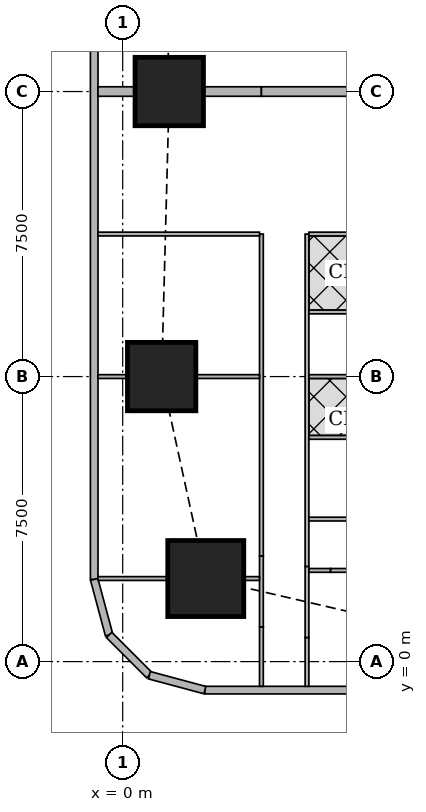
"""IFC4 building model, lengths in metres.
Left out: names, types, materials, properties, quantities, classifications, styles, units other than length and angle.
Written with IfcOpenShell. Run it as: python <this file> out.ifc"""

import sys

from ifc_helpers import new_model, si_unit, direction, frame, frame_2d, origin, origin_2d, place, context, subcontext, project, spatial, rectangle, extrude, element, fill, save


model = new_model("IFC4")
c1 = context("Model", 3, precision=1e-05, world=origin(), true_north=direction((0.0, 1.0)))
c2 = subcontext(c1, "Body", "Model", "MODEL_VIEW")
j1 = project(units=[si_unit("LENGTHUNIT", "METRE"), si_unit("PLANEANGLEUNIT", "RADIAN")], contexts=[c1])
p1 = place(None, origin())
s1 = spatial("IfcSite", under=j1, at=p1, CompositionType="ELEMENT")
p2 = place(p1, origin())
s2 = spatial("IfcBuilding", under=s1, at=p2, CompositionType="ELEMENT")
p3 = place(p2, frame((0.0, 0.0, 180.8)))
s3 = spatial("IfcBuildingStorey", under=s2, at=p3, CompositionType="ELEMENT", Elevation=180.8)
p4 = place(p3, frame((2.186, 2.186, 0.0), z_axis=(0.0, 0.0, 1.0), x_axis=(1.0, 0.0, 0.0)))
e1 = element("IfcColumn", 1, at=p4, inside=s3, PredefinedType="COLUMN", context=c2, shape_type="SweptSolid", body=[
    extrude(rectangle(XDim=2.0, YDim=2.0, at=origin_2d()), origin(), (0.0, 0.0, 1.0), 3.75),
])
for number, where, z_axis, x_axis in (
    (2, (1.025, 7.5, 0.0), (0.0, 0.0, 1.0), (1.0, 0.0, 0.0)),
    (3, (1.225, 15.0, 0.0), (0.0, 0.0, 1.0), (1.0, 0.0, 0.0)),
):
    element("IfcColumn", number, at=place(p3, frame(where, z_axis=z_axis, x_axis=x_axis)), inside=s3, PredefinedType="COLUMN", context=c2, shape_type="SweptSolid", body=[
        extrude(rectangle(XDim=1.8, YDim=1.8, at=origin_2d()), origin(), (0.0, 0.0, 1.0), 3.75),
    ])
p5 = place(p3, frame((2.163, -0.75, 0.0), z_axis=(0.0, 0.0, 1.0), x_axis=(1.0, 0.0, 0.0)))
e4 = element("IfcWall", 4, at=p5, inside=s3, PredefinedType="SOLIDWALL", context=c2, shape_type="SweptSolid", body=[
    extrude(rectangle(XDim=45.628, YDim=0.2, at=frame_2d((22.814, 0.0))), origin(), (0.0, 0.0, 1.0), 3.5),
])
p6 = place(p5, frame((9.537, 0.0, 0.9)))
e5 = element("IfcOpeningElement", 5, at=p6, cuts=e4, PredefinedType="OPENING", context=c2, shape_type="SweptSolid", body=[
    extrude(rectangle(XDim=1.8, YDim=1.5, at=frame_2d((0.9, 0.75))), frame((0.0, 0.11, 0.0), z_axis=(0.0, -1.0, 0.0), x_axis=(1.0, 0.0, 0.0)), (0.0, 0.0, 1.0), 0.22),
])
p7 = place(p5, frame((13.137, 0.0, 0.9)))
e6 = element("IfcOpeningElement", 6, at=p7, cuts=e4, PredefinedType="OPENING", context=c2, shape_type="SweptSolid", body=[
    extrude(rectangle(XDim=1.8, YDim=1.5, at=frame_2d((0.9, 0.75))), frame((0.0, 0.11, 0.0), z_axis=(0.0, -1.0, 0.0), x_axis=(1.0, 0.0, 0.0)), (0.0, 0.0, 1.0), 0.22),
])
p8 = place(p5, frame((16.737, 0.0, 0.9)))
e7 = element("IfcOpeningElement", 7, at=p8, cuts=e4, PredefinedType="OPENING", context=c2, shape_type="SweptSolid", body=[
    extrude(rectangle(XDim=1.8, YDim=1.5, at=frame_2d((0.9, 0.75))), frame((0.0, 0.11, 0.0), z_axis=(0.0, -1.0, 0.0), x_axis=(1.0, 0.0, 0.0)), (0.0, 0.0, 1.0), 0.22),
])
p9 = place(p5, frame((20.337, 0.0, 0.9)))
e8 = element("IfcOpeningElement", 8, at=p9, cuts=e4, PredefinedType="OPENING", context=c2, shape_type="SweptSolid", body=[
    extrude(rectangle(XDim=1.8, YDim=1.5, at=frame_2d((0.9, 0.75))), frame((0.0, 0.11, 0.0), z_axis=(0.0, -1.0, 0.0), x_axis=(1.0, 0.0, 0.0)), (0.0, 0.0, 1.0), 0.22),
])
p10 = place(p5, frame((23.937, 0.0, 0.9)))
e9 = element("IfcOpeningElement", 9, at=p10, cuts=e4, PredefinedType="OPENING", context=c2, shape_type="SweptSolid", body=[
    extrude(rectangle(XDim=1.8, YDim=1.5, at=frame_2d((0.9, 0.75))), frame((0.0, 0.11, 0.0), z_axis=(0.0, -1.0, 0.0), x_axis=(1.0, 0.0, 0.0)), (0.0, 0.0, 1.0), 0.22),
])
p11 = place(p5, frame((27.537, 0.0, 0.9)))
e10 = element("IfcOpeningElement", 10, at=p11, cuts=e4, PredefinedType="OPENING", context=c2, shape_type="SweptSolid", body=[
    extrude(rectangle(XDim=1.8, YDim=1.5, at=frame_2d((0.9, 0.75))), frame((0.0, 0.11, 0.0), z_axis=(0.0, -1.0, 0.0), x_axis=(1.0, 0.0, 0.0)), (0.0, 0.0, 1.0), 0.22),
])
p12 = place(p5, frame((31.137, 0.0, 0.9)))
e11 = element("IfcOpeningElement", 11, at=p12, cuts=e4, PredefinedType="OPENING", context=c2, shape_type="SweptSolid", body=[
    extrude(rectangle(XDim=1.8, YDim=1.5, at=frame_2d((0.9, 0.75))), frame((0.0, 0.11, 0.0), z_axis=(0.0, -1.0, 0.0), x_axis=(1.0, 0.0, 0.0)), (0.0, 0.0, 1.0), 0.22),
])
p13 = place(p5, frame((34.737, 0.0, 0.9)))
e12 = element("IfcOpeningElement", 12, at=p13, cuts=e4, PredefinedType="OPENING", context=c2, shape_type="SweptSolid", body=[
    extrude(rectangle(XDim=1.8, YDim=1.5, at=frame_2d((0.9, 0.75))), frame((0.0, 0.11, 0.0), z_axis=(0.0, -1.0, 0.0), x_axis=(1.0, 0.0, 0.0)), (0.0, 0.0, 1.0), 0.22),
])
p14 = place(p3, frame((-0.75, 42.837, 0.0), z_axis=(0.0, 0.0, 1.0), x_axis=(0.0, -1.0, 0.0)))
e13 = element("IfcWall", 13, at=p14, inside=s3, PredefinedType="SOLIDWALL", context=c2, shape_type="SweptSolid", body=[
    extrude(rectangle(XDim=40.674, YDim=0.2, at=frame_2d((20.337, 0.0))), origin(), (0.0, 0.0, 1.0), 3.5),
])
p15 = place(p14, frame((1.78, 0.0, 0.9)))
e14 = element("IfcOpeningElement", 14, at=p15, cuts=e13, PredefinedType="OPENING", context=c2, shape_type="SweptSolid", body=[
    extrude(rectangle(XDim=1.8, YDim=1.5, at=frame_2d((0.9, 0.75))), frame((0.0, 0.11, 0.0), z_axis=(0.0, -1.0, 0.0), x_axis=(1.0, 0.0, 0.0)), (0.0, 0.0, 1.0), 0.22),
])
p16 = place(p14, frame((6.312, 0.0, 0.9)))
e15 = element("IfcOpeningElement", 15, at=p16, cuts=e13, PredefinedType="OPENING", context=c2, shape_type="SweptSolid", body=[
    extrude(rectangle(XDim=1.8, YDim=1.5, at=frame_2d((0.9, 0.75))), frame((0.0, 0.11, 0.0), z_axis=(0.0, -1.0, 0.0), x_axis=(1.0, 0.0, 0.0)), (0.0, 0.0, 1.0), 0.22),
])
p17 = place(p14, frame((10.062, 0.0, 0.9)))
e16 = element("IfcOpeningElement", 16, at=p17, cuts=e13, PredefinedType="OPENING", context=c2, shape_type="SweptSolid", body=[
    extrude(rectangle(XDim=1.8, YDim=1.5, at=frame_2d((0.9, 0.75))), frame((0.0, 0.11, 0.0), z_axis=(0.0, -1.0, 0.0), x_axis=(1.0, 0.0, 0.0)), (0.0, 0.0, 1.0), 0.22),
])
p18 = place(p14, frame((13.812, 0.0, 0.9)))
e17 = element("IfcOpeningElement", 17, at=p18, cuts=e13, PredefinedType="OPENING", context=c2, shape_type="SweptSolid", body=[
    extrude(rectangle(XDim=1.8, YDim=1.5, at=frame_2d((0.9, 0.75))), frame((0.0, 0.11, 0.0), z_axis=(0.0, -1.0, 0.0), x_axis=(1.0, 0.0, 0.0)), (0.0, 0.0, 1.0), 0.22),
])
p19 = place(p14, frame((17.562, 0.0, 0.9)))
e18 = element("IfcOpeningElement", 18, at=p19, cuts=e13, PredefinedType="OPENING", context=c2, shape_type="SweptSolid", body=[
    extrude(rectangle(XDim=1.8, YDim=1.5, at=frame_2d((0.9, 0.75))), frame((0.0, 0.11, 0.0), z_axis=(0.0, -1.0, 0.0), x_axis=(1.0, 0.0, 0.0)), (0.0, 0.0, 1.0), 0.22),
])
p20 = place(p14, frame((21.312, 0.0, 0.9)))
e19 = element("IfcOpeningElement", 19, at=p20, cuts=e13, PredefinedType="OPENING", context=c2, shape_type="SweptSolid", body=[
    extrude(rectangle(XDim=1.8, YDim=1.5, at=frame_2d((0.9, 0.75))), frame((0.0, 0.11, 0.0), z_axis=(0.0, -1.0, 0.0), x_axis=(1.0, 0.0, 0.0)), (0.0, 0.0, 1.0), 0.22),
])
p21 = place(p14, frame((25.062, 0.0, 0.9)))
e20 = element("IfcOpeningElement", 20, at=p21, cuts=e13, PredefinedType="OPENING", context=c2, shape_type="SweptSolid", body=[
    extrude(rectangle(XDim=1.8, YDim=1.5, at=frame_2d((0.9, 0.75))), frame((0.0, 0.11, 0.0), z_axis=(0.0, -1.0, 0.0), x_axis=(1.0, 0.0, 0.0)), (0.0, 0.0, 1.0), 0.22),
])
p22 = place(p14, frame((28.812, 0.0, 0.9)))
e21 = element("IfcOpeningElement", 21, at=p22, cuts=e13, PredefinedType="OPENING", context=c2, shape_type="SweptSolid", body=[
    extrude(rectangle(XDim=1.8, YDim=1.5, at=frame_2d((0.9, 0.75))), frame((0.0, 0.11, 0.0), z_axis=(0.0, -1.0, 0.0), x_axis=(1.0, 0.0, 0.0)), (0.0, 0.0, 1.0), 0.22),
])
p23 = place(p14, frame((32.562, 0.0, 0.9)))
e22 = element("IfcOpeningElement", 22, at=p23, cuts=e13, PredefinedType="OPENING", context=c2, shape_type="SweptSolid", body=[
    extrude(rectangle(XDim=1.8, YDim=1.5, at=frame_2d((0.9, 0.75))), frame((0.0, 0.11, 0.0), z_axis=(0.0, -1.0, 0.0), x_axis=(1.0, 0.0, 0.0)), (0.0, 0.0, 1.0), 0.22),
])
p24 = place(p14, frame((37.094, 0.0, 0.9)))
e23 = element("IfcOpeningElement", 23, at=p24, cuts=e13, PredefinedType="OPENING", context=c2, shape_type="SweptSolid", body=[
    extrude(rectangle(XDim=1.8, YDim=1.5, at=frame_2d((0.9, 0.75))), frame((0.0, 0.11, 0.0), z_axis=(0.0, -1.0, 0.0), x_axis=(1.0, 0.0, 0.0)), (0.0, 0.0, 1.0), 0.22),
])
p25 = place(p3, frame((-0.75, 2.163, 0.0), z_axis=(0.0, 0.0, 1.0), x_axis=(0.259168954497, -0.965832000415, 0.0)))
e24 = element("IfcWall", 24, at=p25, inside=s3, PredefinedType="SOLIDWALL", context=c2, shape_type="SweptSolid", body=[
    extrude(rectangle(XDim=1.513, YDim=0.2, at=frame_2d((0.756, 0.0))), origin(), (0.0, 0.0, 1.0), 3.5),
])
p26 = place(p3, frame((-0.358, 0.702, 0.0), z_axis=(0.0, 0.0, 1.0), x_axis=(0.707106781187, -0.707106781187, 0.0)))
e25 = element("IfcWall", 25, at=p26, inside=s3, PredefinedType="SOLIDWALL", context=c2, shape_type="SweptSolid", body=[
    extrude(rectangle(XDim=1.499, YDim=0.2, at=frame_2d((0.75, 0.0))), origin(), (0.0, 0.0, 1.0), 3.5),
])
p27 = place(p3, frame((0.702, -0.358, 0.0), z_axis=(0.0, 0.0, 1.0), x_axis=(0.965832000415, -0.259168954497, 0.0)))
e26 = element("IfcWall", 26, at=p27, inside=s3, PredefinedType="SOLIDWALL", context=c2, shape_type="SweptSolid", body=[
    extrude(rectangle(XDim=1.513, YDim=0.2, at=frame_2d((0.756, 0.0))), origin(), (0.0, 0.0, 1.0), 3.5),
])
p28 = place(p3, frame((3.65, -0.65, 0.0), z_axis=(0.0, 0.0, 1.0), x_axis=(0.0, 1.0, 0.0)))
e27 = element("IfcWall", 27, at=p28, inside=s3, PredefinedType="PARTITIONING", context=c2, shape_type="SweptSolid", body=[
    extrude(rectangle(XDim=1.562, YDim=0.1, at=frame_2d((0.781, 0.0))), origin(), (0.0, 0.0, 1.0), 3.5),
])
p29 = place(p3, frame((3.65, 0.912, 0.0), z_axis=(0.0, 0.0, 1.0), x_axis=(0.0, 1.0, 0.0)))
e28 = element("IfcWall", 28, at=p29, inside=s3, PredefinedType="PARTITIONING", context=c2, shape_type="SweptSolid", body=[
    extrude(rectangle(XDim=1.87, YDim=0.1, at=frame_2d((0.935, 0.0))), origin(), (0.0, 0.0, 1.0), 2.1),
])
p30 = place(p3, frame((3.65, 2.782, 0.0), z_axis=(0.0, 0.0, 1.0), x_axis=(0.0, 1.0, 0.0)))
e29 = element("IfcWall", 29, at=p30, inside=s3, PredefinedType="PARTITIONING", context=c2, shape_type="SweptSolid", body=[
    extrude(rectangle(XDim=8.468, YDim=0.1, at=frame_2d((4.234, 0.0))), origin(), (0.0, 0.0, 1.0), 3.5),
])
p31 = place(p30, frame((7.368, 0.0, 0.0)))
e30 = element("IfcOpeningElement", 30, at=p31, cuts=e29, PredefinedType="OPENING", context=c2, shape_type="SweptSolid", body=[
    extrude(rectangle(XDim=0.9, YDim=2.1, at=frame_2d((0.45, 1.05))), frame((0.0, 0.06, 0.0), z_axis=(0.0, -1.0, 0.0), x_axis=(1.0, 0.0, 0.0)), (0.0, 0.0, 1.0), 0.12),
])
p32 = place(p30, frame((3.618, 0.0, 0.0)))
e31 = element("IfcOpeningElement", 31, at=p32, cuts=e29, PredefinedType="OPENING", context=c2, shape_type="SweptSolid", body=[
    extrude(rectangle(XDim=0.9, YDim=2.1, at=frame_2d((0.45, 1.05))), frame((0.0, 0.06, 0.0), z_axis=(0.0, -1.0, 0.0), x_axis=(1.0, 0.0, 0.0)), (0.0, 0.0, 1.0), 0.12),
])
p33 = place(p3, frame((4.85, -0.65, 0.0), z_axis=(0.0, 0.0, 1.0), x_axis=(0.0, 1.0, 0.0)))
e32 = element("IfcWall", 32, at=p33, inside=s3, PredefinedType="PARTITIONING", context=c2, shape_type="SweptSolid", body=[
    extrude(rectangle(XDim=1.284, YDim=0.1, at=frame_2d((0.642, 0.0))), origin(), (0.0, 0.0, 1.0), 3.5),
])
p34 = place(p33, frame((0.234, 0.0, 0.0)))
e33 = element("IfcOpeningElement", 33, at=p34, cuts=e32, PredefinedType="OPENING", context=c2, shape_type="SweptSolid", body=[
    extrude(rectangle(XDim=0.9, YDim=2.1, at=frame_2d((0.45, 1.05))), frame((0.0, 0.06, 0.0), z_axis=(0.0, -1.0, 0.0), x_axis=(1.0, 0.0, 0.0)), (0.0, 0.0, 1.0), 0.12),
])
p35 = place(p3, frame((4.85, 0.634, 0.0), z_axis=(0.0, 0.0, 1.0), x_axis=(0.0, 1.0, 0.0)))
e34 = element("IfcWall", 34, at=p35, inside=s3, PredefinedType="PARTITIONING", context=c2, shape_type="SweptSolid", body=[
    extrude(rectangle(XDim=1.871, YDim=0.1, at=frame_2d((0.936, 0.0))), origin(), (0.0, 0.0, 1.0), 2.1),
])
p36 = place(p3, frame((4.85, 2.505, 0.0), z_axis=(0.0, 0.0, 1.0), x_axis=(0.0, 1.0, 0.0)))
e35 = element("IfcWall", 35, at=p36, inside=s3, PredefinedType="PARTITIONING", context=c2, shape_type="SweptSolid", body=[
    extrude(rectangle(XDim=8.745, YDim=0.1, at=frame_2d((4.373, 0.0))), origin(), (0.0, 0.0, 1.0), 3.5),
])
p37 = place(p36, frame((7.27, 0.0, 0.0)))
e36 = element("IfcOpeningElement", 36, at=p37, cuts=e35, PredefinedType="OPENING", context=c2, shape_type="SweptSolid", body=[
    extrude(rectangle(XDim=0.9, YDim=2.1, at=frame_2d((0.45, 1.05))), frame((0.0, 0.06, 0.0), z_axis=(0.0, -1.0, 0.0), x_axis=(1.0, 0.0, 0.0)), (0.0, 0.0, 1.0), 0.12),
])
p38 = place(p36, frame((3.745, 0.0, 0.0)))
e37 = element("IfcOpeningElement", 37, at=p38, cuts=e35, PredefinedType="OPENING", context=c2, shape_type="SweptSolid", body=[
    extrude(rectangle(XDim=0.9, YDim=2.1, at=frame_2d((0.45, 1.05))), frame((0.0, 0.06, 0.0), z_axis=(0.0, -1.0, 0.0), x_axis=(1.0, 0.0, 0.0)), (0.0, 0.0, 1.0), 0.12),
])
p39 = place(p36, frame((5.395, 0.0, 0.0)))
e38 = element("IfcOpeningElement", 38, at=p39, cuts=e35, PredefinedType="OPENING", context=c2, shape_type="SweptSolid", body=[
    extrude(rectangle(XDim=0.9, YDim=2.1, at=frame_2d((0.45, 1.05))), frame((0.0, 0.06, 0.0), z_axis=(0.0, -1.0, 0.0), x_axis=(1.0, 0.0, 0.0)), (0.0, 0.0, 1.0), 0.12),
])
p40 = place(p36, frame((1.87, 0.0, 0.0)))
e39 = element("IfcOpeningElement", 39, at=p40, cuts=e35, PredefinedType="OPENING", context=c2, shape_type="SweptSolid", body=[
    extrude(rectangle(XDim=0.9, YDim=2.1, at=frame_2d((0.45, 1.05))), frame((0.0, 0.06, 0.0), z_axis=(0.0, -1.0, 0.0), x_axis=(1.0, 0.0, 0.0)), (0.0, 0.0, 1.0), 0.12),
])
p41 = place(p3, frame((-0.65, 2.186, 0.0), z_axis=(0.0, 0.0, 1.0), x_axis=(1.0, 0.0, 0.0)))
e40 = element("IfcWall", 40, at=p41, inside=s3, PredefinedType="PARTITIONING", context=c2, shape_type="SweptSolid", body=[
    extrude(rectangle(XDim=1.835, YDim=0.1, at=frame_2d((0.917, 0.0))), origin(), (0.0, 0.0, 1.0), 3.5),
])
p42 = place(p3, frame((3.187, 2.186, 0.0), z_axis=(0.0, 0.0, 1.0), x_axis=(1.0, 0.0, 0.0)))
e41 = element("IfcWall", 41, at=p42, inside=s3, PredefinedType="PARTITIONING", context=c2, shape_type="SweptSolid", body=[
    extrude(rectangle(XDim=0.413, YDim=0.1, at=frame_2d((0.207, 0.0))), origin(), (0.0, 0.0, 1.0), 2.1),
])
p43 = place(p3, frame((-0.65, 7.5, 0.0), z_axis=(0.0, 0.0, 1.0), x_axis=(1.0, 0.0, 0.0)))
e42 = element("IfcWall", 42, at=p43, inside=s3, PredefinedType="PARTITIONING", context=c2, shape_type="SweptSolid", body=[
    extrude(rectangle(XDim=0.774, YDim=0.1, at=frame_2d((0.387, 0.0))), origin(), (0.0, 0.0, 1.0), 3.5),
])
p44 = place(p3, frame((1.926, 7.5, 0.0), z_axis=(0.0, 0.0, 1.0), x_axis=(1.0, 0.0, 0.0)))
e43 = element("IfcWall", 43, at=p44, inside=s3, PredefinedType="PARTITIONING", context=c2, shape_type="SweptSolid", body=[
    extrude(rectangle(XDim=1.674, YDim=0.1, at=frame_2d((0.837, 0.0))), origin(), (0.0, 0.0, 1.0), 2.1),
])
p45 = place(p3, frame((-0.65, 11.25, 0.0), z_axis=(0.0, 0.0, 1.0), x_axis=(1.0, 0.0, 0.0)))
e44 = element("IfcWall", 44, at=p45, inside=s3, PredefinedType="PARTITIONING", context=c2, shape_type="SweptSolid", body=[
    extrude(rectangle(XDim=4.25, YDim=0.1, at=frame_2d((2.125, 0.0))), origin(), (0.0, 0.0, 1.0), 2.1),
])
p46 = place(p3, frame((4.9, 3.75, 0.0), z_axis=(0.0, 0.0, 1.0), x_axis=(1.0, 0.0, 0.0)))
e45 = element("IfcWall", 45, at=p46, inside=s3, PredefinedType="PARTITIONING", context=c2, shape_type="SweptSolid", body=[
    extrude(rectangle(XDim=3.525, YDim=0.1, at=frame_2d((1.763, 0.0))), origin(), (0.0, 0.0, 1.0), 3.5),
])
p47 = place(p3, frame((4.9, 7.5, 0.0), z_axis=(0.0, 0.0, 1.0), x_axis=(1.0, 0.0, 0.0)))
e46 = element("IfcWall", 46, at=p47, inside=s3, PredefinedType="PARTITIONING", context=c2, shape_type="SweptSolid", body=[
    extrude(rectangle(XDim=1.549, YDim=0.1, at=frame_2d((0.774, 0.0))), origin(), (0.0, 0.0, 1.0), 3.5),
])
for number, where, z_axis, x_axis in (
    (47, (4.9, 11.25, 0.0), (0.0, 0.0, 1.0), (1.0, 0.0, 0.0)),
    (48, (4.9, 9.2, 0.0), (0.0, 0.0, 1.0), (1.0, 0.0, 0.0)),
    (49, (4.9, 5.9, 0.0), (0.0, 0.0, 1.0), (1.0, 0.0, 0.0)),
):
    element("IfcWall", number, at=place(p3, frame(where, z_axis=z_axis, x_axis=x_axis)), inside=s3, PredefinedType="PARTITIONING", context=c2, shape_type="SweptSolid", body=[
        extrude(rectangle(XDim=3.525, YDim=0.1, at=frame_2d((1.763, 0.0))), origin(), (0.0, 0.0, 1.0), 3.5),
    ])
p48 = place(p3, frame((-0.65, 15.0, 0.0), z_axis=(0.0, 0.0, 1.0), x_axis=(1.0, 0.0, 0.0)))
e50 = element("IfcWall", 50, at=p48, inside=s3, PredefinedType="SOLIDWALL", context=c2, shape_type="SweptSolid", body=[
    extrude(rectangle(XDim=0.974, YDim=0.25, at=frame_2d((0.487, 0.0))), origin(), (0.0, 0.0, 1.0), 2.1),
])
p49 = place(p3, frame((2.126, 15.0, 0.0), z_axis=(0.0, 0.0, 1.0), x_axis=(1.0, 0.0, 0.0)))
e51 = element("IfcWall", 51, at=p49, inside=s3, PredefinedType="SOLIDWALL", context=c2, shape_type="SweptSolid", body=[
    extrude(rectangle(XDim=1.524, YDim=0.25, at=frame_2d((0.762, 0.0))), origin(), (0.0, 0.0, 1.0), 2.1),
])
p50 = place(p3, frame((3.65, 15.0, 0.0), z_axis=(0.0, 0.0, 1.0), x_axis=(1.0, 0.0, 0.0)))
e52 = element("IfcWall", 52, at=p50, inside=s3, PredefinedType="SOLIDWALL", context=c2, shape_type="SweptSolid", body=[
    extrude(rectangle(XDim=2.799, YDim=0.25, at=frame_2d((1.399, 0.0))), origin(), (0.0, 0.0, 1.0), 3.5),
])
p51 = place(p3, frame((5.467, 2.4, 0.0), z_axis=(0.0, 0.0, 1.0), x_axis=(1.0, 0.0, 0.0)))
e53 = element("IfcWall", 53, at=p51, inside=s3, PredefinedType="PARTITIONING", context=c2, shape_type="SweptSolid", body=[
    extrude(rectangle(XDim=2.958, YDim=0.1, at=frame_2d((1.479, 0.0))), origin(), (0.0, 0.0, 1.0), 3.5),
])
p52 = place(p51, frame((0.108, 0.0, 0.0)))
e54 = element("IfcOpeningElement", 54, at=p52, cuts=e53, PredefinedType="OPENING", context=c2, shape_type="SweptSolid", body=[
    extrude(rectangle(XDim=0.9, YDim=2.1, at=frame_2d((0.45, 1.05))), frame((0.0, 0.06, 0.0), z_axis=(0.0, -1.0, 0.0), x_axis=(1.0, 0.0, 0.0)), (0.0, 0.0, 1.0), 0.12),
])
p53 = place(p3, frame((5.467, 2.4, 0.0), z_axis=(0.0, 0.0, 1.0), x_axis=(-1.0, 0.0, 0.0)))
e55 = element("IfcWall", 55, at=p53, inside=s3, PredefinedType="PARTITIONING", context=c2, shape_type="SweptSolid", body=[
    extrude(rectangle(XDim=0.567, YDim=0.1, at=frame_2d((0.284, 0.0))), origin(), (0.0, 0.0, 1.0), 2.1),
])
p54 = place(p21, origin())
e56 = element("IfcWindow", 56, at=p54, inside=s3, PartitioningType="SINGLE_PANEL", PredefinedType="WINDOW", context=c2, shape_type="SweptSolid", body=[
    extrude(rectangle(XDim=1.8, YDim=1.5, at=frame_2d((0.9, 0.75))), frame((0.0, 0.03, 0.0), z_axis=(0.0, -1.0, 0.0), x_axis=(1.0, 0.0, 0.0)), (0.0, 0.0, 1.0), 0.06),
])
fill(e20, e56)
p55 = place(p22, origin())
e57 = element("IfcWindow", 57, at=p55, inside=s3, PartitioningType="SINGLE_PANEL", PredefinedType="WINDOW", context=c2, shape_type="SweptSolid", body=[
    extrude(rectangle(XDim=1.8, YDim=1.5, at=frame_2d((0.9, 0.75))), frame((0.0, 0.03, 0.0), z_axis=(0.0, -1.0, 0.0), x_axis=(1.0, 0.0, 0.0)), (0.0, 0.0, 1.0), 0.06),
])
fill(e21, e57)
p56 = place(p23, origin())
e58 = element("IfcWindow", 58, at=p56, inside=s3, PartitioningType="SINGLE_PANEL", PredefinedType="WINDOW", context=c2, shape_type="SweptSolid", body=[
    extrude(rectangle(XDim=1.8, YDim=1.5, at=frame_2d((0.9, 0.75))), frame((0.0, 0.03, 0.0), z_axis=(0.0, -1.0, 0.0), x_axis=(1.0, 0.0, 0.0)), (0.0, 0.0, 1.0), 0.06),
])
fill(e22, e58)
p57 = place(p24, origin())
e59 = element("IfcWindow", 59, at=p57, inside=s3, PartitioningType="SINGLE_PANEL", PredefinedType="WINDOW", context=c2, shape_type="SweptSolid", body=[
    extrude(rectangle(XDim=1.8, YDim=1.5, at=frame_2d((0.9, 0.75))), frame((0.0, 0.03, 0.0), z_axis=(0.0, -1.0, 0.0), x_axis=(1.0, 0.0, 0.0)), (0.0, 0.0, 1.0), 0.06),
])
fill(e23, e59)
p58 = place(p31, origin())
e60 = element("IfcDoor", 60, at=p58, inside=s3, OperationType="SINGLE_SWING_RIGHT", PredefinedType="DOOR", context=c2, shape_type="SweptSolid", body=[
    extrude(rectangle(XDim=0.9, YDim=2.1, at=frame_2d((0.45, 1.05))), frame((0.0, 0.025, 0.0), z_axis=(0.0, -1.0, 0.0), x_axis=(1.0, 0.0, 0.0)), (0.0, 0.0, 1.0), 0.05),
])
fill(e30, e60)
p59 = place(p32, origin())
e61 = element("IfcDoor", 61, at=p59, inside=s3, OperationType="SINGLE_SWING_RIGHT", PredefinedType="DOOR", context=c2, shape_type="SweptSolid", body=[
    extrude(rectangle(XDim=0.9, YDim=2.1, at=frame_2d((0.45, 1.05))), frame((0.0, 0.025, 0.0), z_axis=(0.0, -1.0, 0.0), x_axis=(1.0, 0.0, 0.0)), (0.0, 0.0, 1.0), 0.05),
])
fill(e31, e61)
p60 = place(p37, origin())
e62 = element("IfcDoor", 62, at=p60, inside=s3, OperationType="SINGLE_SWING_LEFT", PredefinedType="DOOR", context=c2, shape_type="SweptSolid", body=[
    extrude(rectangle(XDim=0.9, YDim=2.1, at=frame_2d((0.45, 1.05))), frame((0.0, 0.025, 0.0), z_axis=(0.0, -1.0, 0.0), x_axis=(1.0, 0.0, 0.0)), (0.0, 0.0, 1.0), 0.05),
])
fill(e36, e62)
p61 = place(p38, origin())
e63 = element("IfcDoor", 63, at=p61, inside=s3, OperationType="SINGLE_SWING_LEFT", PredefinedType="DOOR", context=c2, shape_type="SweptSolid", body=[
    extrude(rectangle(XDim=0.9, YDim=2.1, at=frame_2d((0.45, 1.05))), frame((0.0, 0.025, 0.0), z_axis=(0.0, -1.0, 0.0), x_axis=(1.0, 0.0, 0.0)), (0.0, 0.0, 1.0), 0.05),
])
fill(e37, e63)
p62 = place(p34, origin())
e64 = element("IfcDoor", 64, at=p62, inside=s3, OperationType="SINGLE_SWING_LEFT", PredefinedType="DOOR", context=c2, shape_type="SweptSolid", body=[
    extrude(rectangle(XDim=0.9, YDim=2.1, at=frame_2d((0.45, 1.05))), frame((0.0, 0.025, 0.0), z_axis=(0.0, -1.0, 0.0), x_axis=(1.0, 0.0, 0.0)), (0.0, 0.0, 1.0), 0.05),
])
fill(e33, e64)
p63 = place(p39, origin())
e65 = element("IfcDoor", 65, at=p63, inside=s3, OperationType="SINGLE_SWING_RIGHT", PredefinedType="DOOR", context=c2, shape_type="SweptSolid", body=[
    extrude(rectangle(XDim=0.9, YDim=2.1, at=frame_2d((0.45, 1.05))), frame((0.0, 0.025, 0.0), z_axis=(0.0, -1.0, 0.0), x_axis=(1.0, 0.0, 0.0)), (0.0, 0.0, 1.0), 0.05),
])
fill(e38, e65)
p64 = place(p40, origin())
e66 = element("IfcDoor", 66, at=p64, inside=s3, OperationType="SINGLE_SWING_RIGHT", PredefinedType="DOOR", context=c2, shape_type="SweptSolid", body=[
    extrude(rectangle(XDim=0.9, YDim=2.1, at=frame_2d((0.45, 1.05))), frame((0.0, 0.025, 0.0), z_axis=(0.0, -1.0, 0.0), x_axis=(1.0, 0.0, 0.0)), (0.0, 0.0, 1.0), 0.05),
])
fill(e39, e66)
p65 = place(p52, origin())
e67 = element("IfcDoor", 67, at=p65, inside=s3, OperationType="SINGLE_SWING_LEFT", PredefinedType="DOOR", context=c2, shape_type="SweptSolid", body=[
    extrude(rectangle(XDim=0.9, YDim=2.1, at=frame_2d((0.45, 1.05))), frame((0.0, 0.025, 0.0), z_axis=(0.0, -1.0, 0.0), x_axis=(1.0, 0.0, 0.0)), (0.0, 0.0, 1.0), 0.05),
])
fill(e54, e67)
save(model, sys.argv[1])
